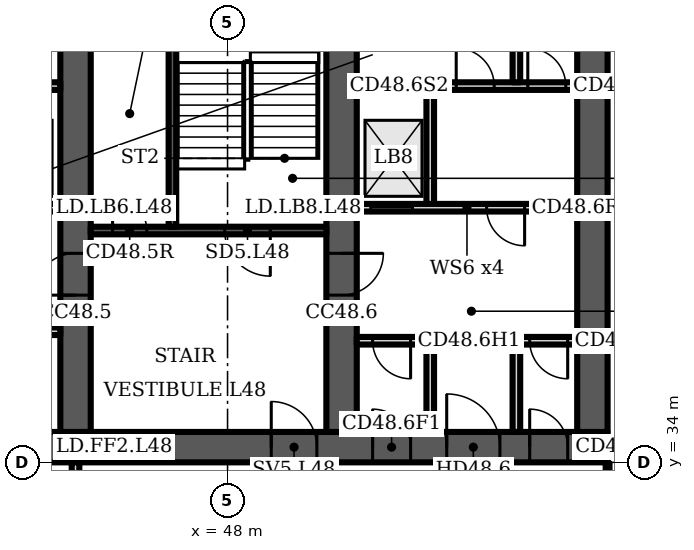
"""IFC4 building model, lengths in metres.
Left out: names, types, materials, properties, quantities, classifications, styles, units other than length and angle.
Written with IfcOpenShell. Run it as: python <this file> out.ifc"""

import sys

from ifc_helpers import new_model, si_unit, direction, frame, frame_2d, origin, place, context, subcontext, project, spatial, polyline, rectangle, outline, extrude, element, fill, save


model = new_model("IFC4")
c1 = context("Model", 3, precision=1e-05, world=origin(), true_north=direction((0.0, 1.0)))
c2 = subcontext(c1, "Body", "Model", "MODEL_VIEW")
j1 = project(units=[si_unit("LENGTHUNIT", "METRE"), si_unit("PLANEANGLEUNIT", "RADIAN")], contexts=[c1])
p1 = place(None, origin())
s1 = spatial("IfcSite", under=j1, at=p1, CompositionType="ELEMENT")
p2 = place(p1, origin())
s2 = spatial("IfcBuilding", under=s1, at=p2, CompositionType="ELEMENT")
p3 = place(p2, frame((0.0, 0.0, 195.1)))
s3 = spatial("IfcBuildingStorey", under=s2, at=p3, CompositionType="ELEMENT", Elevation=195.1)
p4 = place(p3, frame((16.0, 34.4, 0.0), z_axis=(0.0, 0.0, 1.0), x_axis=(1.0, 0.0, 0.0)))
e1 = element("IfcWall", 1, at=p4, inside=s3, PredefinedType="SHEAR", context=c2, shape_type="SweptSolid", body=[
    extrude(rectangle(XDim=42.0, YDim=0.8, at=frame_2d((21.0, 0.0))), origin(), (0.0, 0.0, 1.0), 3.6),
])
p5 = place(p4, frame((3.2, 0.0, 0.0)))
e2 = element("IfcOpeningElement", 2, at=p5, cuts=e1, PredefinedType="OPENING", context=c2, shape_type="SweptSolid", body=[
    extrude(rectangle(XDim=1.0, YDim=2.1, at=frame_2d((0.5, 1.05))), frame((0.0, 0.41, 0.0), z_axis=(0.0, -1.0, 0.0), x_axis=(1.0, 0.0, 0.0)), (0.0, 0.0, 1.0), 0.82),
])
p6 = place(p4, frame((7.65, 0.0, 0.0)))
e3 = element("IfcOpeningElement", 3, at=p6, cuts=e1, PredefinedType="OPENING", context=c2, shape_type="SweptSolid", body=[
    extrude(rectangle(XDim=1.2, YDim=2.1, at=frame_2d((0.6, 1.05))), frame((0.0, 0.41, 0.0), z_axis=(0.0, -1.0, 0.0), x_axis=(1.0, 0.0, 0.0)), (0.0, 0.0, 1.0), 0.82),
])
p7 = place(p4, frame((14.767, 0.0, 0.0)))
e4 = element("IfcOpeningElement", 4, at=p7, cuts=e1, PredefinedType="OPENING", context=c2, shape_type="SweptSolid", body=[
    extrude(rectangle(XDim=1.1, YDim=2.1, at=frame_2d((0.55, 1.05))), frame((0.0, 0.41, 0.0), z_axis=(0.0, -1.0, 0.0), x_axis=(1.0, 0.0, 0.0)), (0.0, 0.0, 1.0), 0.82),
])
p8 = place(p4, frame((19.133, 0.0, 0.0)))
e5 = element("IfcOpeningElement", 5, at=p8, cuts=e1, PredefinedType="OPENING", context=c2, shape_type="SweptSolid", body=[
    extrude(rectangle(XDim=1.1, YDim=2.1, at=frame_2d((0.55, 1.05))), frame((0.0, 0.41, 0.0), z_axis=(0.0, -1.0, 0.0), x_axis=(1.0, 0.0, 0.0)), (0.0, 0.0, 1.0), 0.82),
])
p9 = place(p4, frame((16.8, 0.0, 0.0)))
e6 = element("IfcOpeningElement", 6, at=p9, cuts=e1, PredefinedType="OPENING", context=c2, shape_type="SweptSolid", body=[
    extrude(rectangle(XDim=1.4, YDim=2.1, at=frame_2d((0.7, 1.05))), frame((0.0, 0.41, 0.0), z_axis=(0.0, -1.0, 0.0), x_axis=(1.0, 0.0, 0.0)), (0.0, 0.0, 1.0), 0.82),
])
p10 = place(p4, frame((21.767, 0.0, 0.0)))
e7 = element("IfcOpeningElement", 7, at=p10, cuts=e1, PredefinedType="OPENING", context=c2, shape_type="SweptSolid", body=[
    extrude(rectangle(XDim=1.1, YDim=2.1, at=frame_2d((0.55, 1.05))), frame((0.0, 0.41, 0.0), z_axis=(0.0, -1.0, 0.0), x_axis=(1.0, 0.0, 0.0)), (0.0, 0.0, 1.0), 0.82),
])
p11 = place(p4, frame((23.95, 0.0, 0.0)))
e8 = element("IfcOpeningElement", 8, at=p11, cuts=e1, PredefinedType="OPENING", context=c2, shape_type="SweptSolid", body=[
    extrude(rectangle(XDim=1.1, YDim=2.1, at=frame_2d((0.55, 1.05))), frame((0.0, 0.41, 0.0), z_axis=(0.0, -1.0, 0.0), x_axis=(1.0, 0.0, 0.0)), (0.0, 0.0, 1.0), 0.82),
])
p12 = place(p4, frame((26.133, 0.0, 0.0)))
e9 = element("IfcOpeningElement", 9, at=p12, cuts=e1, PredefinedType="OPENING", context=c2, shape_type="SweptSolid", body=[
    extrude(rectangle(XDim=1.1, YDim=2.1, at=frame_2d((0.55, 1.05))), frame((0.0, 0.41, 0.0), z_axis=(0.0, -1.0, 0.0), x_axis=(1.0, 0.0, 0.0)), (0.0, 0.0, 1.0), 0.82),
])
p13 = place(p4, frame((33.15, 0.0, 0.0)))
e10 = element("IfcOpeningElement", 10, at=p13, cuts=e1, PredefinedType="OPENING", context=c2, shape_type="SweptSolid", body=[
    extrude(rectangle(XDim=1.2, YDim=2.1, at=frame_2d((0.6, 1.05))), frame((0.0, 0.41, 0.0), z_axis=(0.0, -1.0, 0.0), x_axis=(1.0, 0.0, 0.0)), (0.0, 0.0, 1.0), 0.82),
])
p14 = place(p4, frame((35.817, 0.0, 0.0)))
e11 = element("IfcOpeningElement", 11, at=p14, cuts=e1, PredefinedType="OPENING", context=c2, shape_type="SweptSolid", body=[
    extrude(rectangle(XDim=1.0, YDim=2.1, at=frame_2d((0.5, 1.05))), frame((0.0, 0.41, 0.0), z_axis=(0.0, -1.0, 0.0), x_axis=(1.0, 0.0, 0.0)), (0.0, 0.0, 1.0), 0.82),
])
p15 = place(p4, frame((39.95, 0.0, 0.0)))
e12 = element("IfcOpeningElement", 12, at=p15, cuts=e1, PredefinedType="OPENING", context=c2, shape_type="SweptSolid", body=[
    extrude(rectangle(XDim=1.0, YDim=2.1, at=frame_2d((0.5, 1.05))), frame((0.0, 0.41, 0.0), z_axis=(0.0, -1.0, 0.0), x_axis=(1.0, 0.0, 0.0)), (0.0, 0.0, 1.0), 0.82),
])
p16 = place(p4, frame((37.767, 0.0, 0.0)))
e13 = element("IfcOpeningElement", 13, at=p16, cuts=e1, PredefinedType="OPENING", context=c2, shape_type="SweptSolid", body=[
    extrude(rectangle(XDim=1.4, YDim=2.1, at=frame_2d((0.7, 1.05))), frame((0.0, 0.41, 0.0), z_axis=(0.0, -1.0, 0.0), x_axis=(1.0, 0.0, 0.0)), (0.0, 0.0, 1.0), 0.82),
])
p17 = place(p3, frame((44.0, 34.8, 0.0), z_axis=(0.0, 0.0, 1.0), x_axis=(0.0, 1.0, 0.0)))
e14 = element("IfcWall", 14, at=p17, inside=s3, PredefinedType="SHEAR", context=c2, shape_type="SweptSolid", body=[
    extrude(rectangle(XDim=14.374, YDim=0.8, at=frame_2d((7.187, 0.0))), origin(), (0.0, 0.0, 1.0), 3.6),
])
p18 = place(p17, frame((11.312, 0.0, 0.0)))
e15 = element("IfcOpeningElement", 15, at=p18, cuts=e14, PredefinedType="OPENING", context=c2, shape_type="SweptSolid", body=[
    extrude(rectangle(XDim=1.0, YDim=2.1, at=frame_2d((0.5, 1.05))), frame((0.0, 0.41, 0.0), z_axis=(0.0, -1.0, 0.0), x_axis=(1.0, 0.0, 0.0)), (0.0, 0.0, 1.0), 0.82),
])
p19 = place(p17, frame((3.6, 0.0, 0.0)))
e16 = element("IfcOpeningElement", 16, at=p19, cuts=e14, PredefinedType="OPENING", context=c2, shape_type="SweptSolid", body=[
    extrude(rectangle(XDim=1.1, YDim=2.1, at=frame_2d((0.55, 1.05))), frame((0.0, 0.41, 0.0), z_axis=(0.0, -1.0, 0.0), x_axis=(1.0, 0.0, 0.0)), (0.0, 0.0, 1.0), 0.82),
])
p20 = place(p3, frame((51.0, 34.8, 0.0), z_axis=(0.0, 0.0, 1.0), x_axis=(0.0, 1.0, 0.0)))
e17 = element("IfcWall", 17, at=p20, inside=s3, PredefinedType="SHEAR", context=c2, shape_type="SweptSolid", body=[
    extrude(rectangle(XDim=13.762, YDim=0.8, at=frame_2d((6.881, 0.0))), origin(), (0.0, 0.0, 1.0), 3.6),
])
p21 = place(p20, frame((3.6, 0.0, 0.0)))
e18 = element("IfcOpeningElement", 18, at=p21, cuts=e17, PredefinedType="OPENING", context=c2, shape_type="SweptSolid", body=[
    extrude(rectangle(XDim=1.1, YDim=2.1, at=frame_2d((0.55, 1.05))), frame((0.0, 0.41, 0.0), z_axis=(0.0, -1.0, 0.0), x_axis=(1.0, 0.0, 0.0)), (0.0, 0.0, 1.0), 0.82),
])
p22 = place(p3, frame((57.6, 34.8, 0.0), z_axis=(0.0, 0.0, 1.0), x_axis=(0.0, 1.0, 0.0)))
e19 = element("IfcWall", 19, at=p22, inside=s3, PredefinedType="SHEAR", context=c2, shape_type="SweptSolid", body=[
    extrude(rectangle(XDim=13.184, YDim=0.8, at=frame_2d((6.592, 0.0))), origin(), (0.0, 0.0, 1.0), 3.6),
])
p23 = place(p3, frame((37.4, 40.7, 0.0), z_axis=(0.0, 0.0, 1.0), x_axis=(1.0, 0.0, 0.0)))
e20 = element("IfcWall", 20, at=p23, inside=s3, PredefinedType="PARTITIONING", context=c2, shape_type="SweptSolid", body=[
    extrude(rectangle(XDim=6.2, YDim=0.2, at=frame_2d((3.1, 0.0))), origin(), (0.0, 0.0, 1.0), 3.2),
])
p24 = place(p23, frame((0.367, 0.0, 0.0)))
e21 = element("IfcOpeningElement", 21, at=p24, cuts=e20, PredefinedType="OPENING", context=c2, shape_type="SweptSolid", body=[
    extrude(rectangle(XDim=1.1, YDim=2.1, at=frame_2d((0.55, 1.05))), frame((0.0, 0.11, 0.0), z_axis=(0.0, -1.0, 0.0), x_axis=(1.0, 0.0, 0.0)), (0.0, 0.0, 1.0), 0.22),
])
p25 = place(p23, frame((2.55, 0.0, 0.0)))
e22 = element("IfcOpeningElement", 22, at=p25, cuts=e20, PredefinedType="OPENING", context=c2, shape_type="SweptSolid", body=[
    extrude(rectangle(XDim=1.1, YDim=2.1, at=frame_2d((0.55, 1.05))), frame((0.0, 0.11, 0.0), z_axis=(0.0, -1.0, 0.0), x_axis=(1.0, 0.0, 0.0)), (0.0, 0.0, 1.0), 0.22),
])
p26 = place(p23, frame((4.733, 0.0, 0.0)))
e23 = element("IfcOpeningElement", 23, at=p26, cuts=e20, PredefinedType="OPENING", context=c2, shape_type="SweptSolid", body=[
    extrude(rectangle(XDim=1.1, YDim=2.1, at=frame_2d((0.55, 1.05))), frame((0.0, 0.11, 0.0), z_axis=(0.0, -1.0, 0.0), x_axis=(1.0, 0.0, 0.0)), (0.0, 0.0, 1.0), 0.22),
])
p27 = place(p3, frame((0.0, 0.0, -0.0)))
e24 = element("IfcWall", 24, at=p27, inside=s3, PredefinedType="PARTITIONING", context=c2, shape_type="SweptSolid", body=[
    extrude(outline(polyline([(41.567, 37.1), (39.433, 37.1), (39.433, 34.8), (39.233, 34.8), (39.233, 37.65), (37.4, 37.65), (37.4, 37.85), (39.233, 37.85), (39.433, 37.85), (39.433, 37.3), (41.567, 37.3), (41.567, 37.55), (41.767, 37.55), (43.6, 37.55), (43.6, 37.35), (41.767, 37.35), (41.767, 34.8), (41.567, 34.8), (41.567, 37.1)])), origin(), (0.0, 0.0, 1.0), 3.2),
])
p28 = place(p3, frame((0.0, 0.0, -0.0)))
e25 = element("IfcWall", 25, at=p28, inside=s3, PredefinedType="PARTITIONING", context=c2, shape_type="SweptSolid", body=[
    extrude(outline(polyline([(39.433, 40.8), (39.233, 40.8), (39.233, 43.8), (37.4, 43.8), (37.4, 44.0), (43.6, 44.0), (43.6, 43.8), (41.767, 43.8), (41.767, 40.8), (41.567, 40.8), (41.567, 43.8), (39.433, 43.8), (39.433, 40.8)])), origin(), (0.0, 0.0, 1.0), 3.2),
])
p29 = place(p3, frame((44.4, 40.1, 0.0), z_axis=(0.0, 0.0, 1.0), x_axis=(1.0, 0.0, 0.0)))
e26 = element("IfcWall", 26, at=p29, inside=s3, PredefinedType="SHEAR", context=c2, shape_type="SweptSolid", body=[
    extrude(rectangle(XDim=6.2, YDim=0.2, at=frame_2d((3.1, 0.0))), origin(), (0.0, 0.0, 1.0), 3.2),
])
p30 = place(p29, frame((3.525, 0.0, 0.0)))
e27 = element("IfcOpeningElement", 27, at=p30, cuts=e26, PredefinedType="OPENING", context=c2, shape_type="SweptSolid", body=[
    extrude(rectangle(XDim=1.2, YDim=2.1, at=frame_2d((0.6, 1.05))), frame((0.0, 0.11, 0.0), z_axis=(0.0, -1.0, 0.0), x_axis=(1.0, 0.0, 0.0)), (0.0, 0.0, 1.0), 0.22),
])
p31 = place(p29, frame((0.575, 0.0, 0.0)))
e28 = element("IfcOpeningElement", 28, at=p31, cuts=e26, PredefinedType="OPENING", context=c2, shape_type="SweptSolid", body=[
    extrude(rectangle(XDim=0.9, YDim=2.1, at=frame_2d((0.45, 1.05))), frame((0.0, 0.11, 0.0), z_axis=(0.0, -1.0, 0.0), x_axis=(1.0, 0.0, 0.0)), (0.0, 0.0, 1.0), 0.22),
])
p32 = place(p3, frame((46.55, 40.2, 0.0), z_axis=(0.0, 0.0, 1.0), x_axis=(0.0, 1.0, 0.0)))
e29 = element("IfcWall", 29, at=p32, inside=s3, PredefinedType="SHEAR", context=c2, shape_type="SweptSolid", body=[
    extrude(rectangle(XDim=7.2, YDim=0.2, at=frame_2d((3.6, 0.0))), origin(), (0.0, 0.0, 1.0), 3.2),
])
p33 = place(p3, frame((51.4, 37.2, 0.0), z_axis=(0.0, 0.0, 1.0), x_axis=(1.0, 0.0, 0.0)))
e30 = element("IfcWall", 30, at=p33, inside=s3, PredefinedType="PARTITIONING", context=c2, shape_type="SweptSolid", body=[
    extrude(rectangle(XDim=1.833, YDim=0.2, at=frame_2d((0.917, 0.0))), origin(), (0.0, 0.0, 1.0), 3.2),
])
p34 = place(p33, frame((0.417, 0.0, 0.0)))
e31 = element("IfcOpeningElement", 31, at=p34, cuts=e30, PredefinedType="OPENING", context=c2, shape_type="SweptSolid", body=[
    extrude(rectangle(XDim=1.0, YDim=2.1, at=frame_2d((0.5, 1.05))), frame((0.0, 0.11, 0.0), z_axis=(0.0, -1.0, 0.0), x_axis=(1.0, 0.0, 0.0)), (0.0, 0.0, 1.0), 0.22),
])
p35 = place(p3, frame((55.7, 37.2, 0.0), z_axis=(0.0, 0.0, 1.0), x_axis=(1.0, 0.0, 0.0)))
e32 = element("IfcWall", 32, at=p35, inside=s3, PredefinedType="PARTITIONING", context=c2, shape_type="SweptSolid", body=[
    extrude(rectangle(XDim=1.5, YDim=0.2, at=frame_2d((0.75, 0.0))), origin(), (0.0, 0.0, 1.0), 3.2),
])
p36 = place(p35, frame((0.25, 0.0, 0.0)))
e33 = element("IfcOpeningElement", 33, at=p36, cuts=e32, PredefinedType="OPENING", context=c2, shape_type="SweptSolid", body=[
    extrude(rectangle(XDim=1.0, YDim=2.1, at=frame_2d((0.5, 1.05))), frame((0.0, 0.11, 0.0), z_axis=(0.0, -1.0, 0.0), x_axis=(1.0, 0.0, 0.0)), (0.0, 0.0, 1.0), 0.22),
])
p37 = place(p3, frame((51.4, 40.7, 0.0), z_axis=(0.0, 0.0, 1.0), x_axis=(1.0, 0.0, 0.0)))
e34 = element("IfcWall", 34, at=p37, inside=s3, PredefinedType="PARTITIONING", context=c2, shape_type="SweptSolid", body=[
    extrude(rectangle(XDim=5.8, YDim=0.2, at=frame_2d((2.9, 0.0))), origin(), (0.0, 0.0, 1.0), 3.2),
])
p38 = place(p37, frame((0.367, 0.0, 0.0)))
e35 = element("IfcOpeningElement", 35, at=p38, cuts=e34, PredefinedType="OPENING", context=c2, shape_type="SweptSolid", body=[
    extrude(rectangle(XDim=1.1, YDim=2.1, at=frame_2d((0.55, 1.05))), frame((0.0, 0.11, 0.0), z_axis=(0.0, -1.0, 0.0), x_axis=(1.0, 0.0, 0.0)), (0.0, 0.0, 1.0), 0.22),
])
p39 = place(p37, frame((3.417, 0.0, 0.0)))
e36 = element("IfcOpeningElement", 36, at=p39, cuts=e34, PredefinedType="OPENING", context=c2, shape_type="SweptSolid", body=[
    extrude(rectangle(XDim=1.0, YDim=2.1, at=frame_2d((0.5, 1.05))), frame((0.0, 0.11, 0.0), z_axis=(0.0, -1.0, 0.0), x_axis=(1.0, 0.0, 0.0)), (0.0, 0.0, 1.0), 0.22),
])
p40 = place(p3, frame((51.4, 43.9, 0.0), z_axis=(0.0, 0.0, 1.0), x_axis=(1.0, 0.0, 0.0)))
e37 = element("IfcWall", 37, at=p40, inside=s3, PredefinedType="PARTITIONING", context=c2, shape_type="SweptSolid", body=[
    extrude(rectangle(XDim=5.8, YDim=0.2, at=frame_2d((2.9, 0.0))), origin(), (0.0, 0.0, 1.0), 3.2),
])
p41 = place(p40, frame((2.617, 0.0, 0.0)))
e38 = element("IfcOpeningElement", 38, at=p41, cuts=e37, PredefinedType="OPENING", context=c2, shape_type="SweptSolid", body=[
    extrude(rectangle(XDim=1.0, YDim=2.1, at=frame_2d((0.5, 1.05))), frame((0.0, 0.11, 0.0), z_axis=(0.0, -1.0, 0.0), x_axis=(1.0, 0.0, 0.0)), (0.0, 0.0, 1.0), 0.22),
])
p42 = place(p40, frame((4.5, 0.0, 0.0)))
e39 = element("IfcOpeningElement", 39, at=p42, cuts=e37, PredefinedType="OPENING", context=c2, shape_type="SweptSolid", body=[
    extrude(rectangle(XDim=1.0, YDim=2.1, at=frame_2d((0.5, 1.05))), frame((0.0, 0.11, 0.0), z_axis=(0.0, -1.0, 0.0), x_axis=(1.0, 0.0, 0.0)), (0.0, 0.0, 1.0), 0.22),
])
p43 = place(p3, frame((0.0, 0.0, -0.0)))
e40 = element("IfcWall", 40, at=p43, inside=s3, PredefinedType="PARTITIONING", context=c2, shape_type="SweptSolid", body=[
    extrude(outline(polyline([(53.233, 34.8), (53.233, 37.3), (53.433, 37.3), (53.433, 34.8), (53.233, 34.8)])), origin(), (0.0, 0.0, 1.0), 3.2),
])
p44 = place(p3, frame((0.0, 0.0, -0.0)))
e41 = element("IfcWall", 41, at=p44, inside=s3, PredefinedType="PARTITIONING", context=c2, shape_type="SweptSolid", body=[
    extrude(outline(polyline([(55.5, 34.8), (55.5, 37.3), (55.7, 37.3), (55.7, 34.8), (55.5, 34.8)])), origin(), (0.0, 0.0, 1.0), 3.2),
])
p45 = place(p3, frame((0.0, 0.0, -0.0)))
e42 = element("IfcWall", 42, at=p45, inside=s3, PredefinedType="PARTITIONING", context=c2, shape_type="SweptSolid", body=[
    extrude(outline(polyline([(53.433, 40.8), (53.433, 43.8), (53.233, 43.8), (53.233, 40.8), (53.433, 40.8)])), origin(), (0.0, 0.0, 1.0), 3.2),
])
p46 = place(p3, frame((55.6, 44.0, 0.0), z_axis=(0.0, 0.0, 1.0), x_axis=(0.0, 1.0, 0.0)))
e43 = element("IfcWall", 43, at=p46, inside=s3, PredefinedType="PARTITIONING", context=c2, shape_type="SweptSolid", body=[
    extrude(rectangle(XDim=4.034, YDim=0.2, at=frame_2d((2.017, 0.0))), origin(), (0.0, 0.0, 1.0), 3.2),
])
p47 = place(p3, frame((44.0, 30.5, 0.0), z_axis=(0.0, 0.0, 1.0), x_axis=(0.0, 1.0, 0.0)))
e44 = element("IfcWall", 44, at=p47, inside=s3, PredefinedType="PARTITIONING", context=c2, shape_type="SweptSolid", body=[
    extrude(rectangle(XDim=3.5, YDim=0.2, at=frame_2d((1.75, 0.0))), origin(), (0.0, 0.0, 1.0), 3.2),
])
p48 = place(p47, frame((1.2, 0.0, 0.0)))
e45 = element("IfcOpeningElement", 45, at=p48, cuts=e44, PredefinedType="OPENING", context=c2, shape_type="SweptSolid", body=[
    extrude(rectangle(XDim=1.1, YDim=2.1, at=frame_2d((0.55, 1.05))), frame((0.0, 0.11, 0.0), z_axis=(0.0, -1.0, 0.0), x_axis=(1.0, 0.0, 0.0)), (0.0, 0.0, 1.0), 0.22),
])
p49 = place(p3, frame((58.0, 30.5, 0.0), z_axis=(0.0, 0.0, 1.0), x_axis=(0.0, 1.0, 0.0)))
e46 = element("IfcWall", 46, at=p49, inside=s3, PredefinedType="PARTITIONING", context=c2, shape_type="SweptSolid", body=[
    extrude(rectangle(XDim=3.48, YDim=0.1, at=frame_2d((1.74, 0.0))), origin(), (0.0, 0.0, 1.0), 3.2),
])
p50 = place(p30, origin())
e47 = element("IfcDoor", 47, at=p50, inside=s3, OperationType="SINGLE_SWING_RIGHT", PredefinedType="DOOR", context=c2, shape_type="SweptSolid", body=[
    extrude(rectangle(XDim=1.2, YDim=2.1, at=frame_2d((0.6, 1.05))), frame((0.0, 0.025, 0.0), z_axis=(0.0, -1.0, 0.0), x_axis=(1.0, 0.0, 0.0)), (0.0, 0.0, 1.0), 0.05),
])
fill(e27, e47)
p51 = place(p31, origin())
e48 = element("IfcDoor", 48, at=p51, inside=s3, OperationType="SINGLE_SWING_LEFT", PredefinedType="DOOR", context=c2, shape_type="SweptSolid", body=[
    extrude(rectangle(XDim=0.9, YDim=2.1, at=frame_2d((0.45, 1.05))), frame((0.0, 0.025, 0.0), z_axis=(0.0, -1.0, 0.0), x_axis=(1.0, 0.0, 0.0)), (0.0, 0.0, 1.0), 0.05),
])
fill(e28, e48)
p52 = place(p13, origin())
e49 = element("IfcDoor", 49, at=p52, inside=s3, OperationType="SINGLE_SWING_LEFT", PredefinedType="DOOR", context=c2, shape_type="SweptSolid", body=[
    extrude(rectangle(XDim=1.2, YDim=2.1, at=frame_2d((0.6, 1.05))), frame((0.0, 0.025, 0.0), z_axis=(0.0, -1.0, 0.0), x_axis=(1.0, 0.0, 0.0)), (0.0, 0.0, 1.0), 0.05),
])
fill(e10, e49)
p53 = place(p14, origin())
e50 = element("IfcDoor", 50, at=p53, inside=s3, OperationType="SINGLE_SWING_LEFT", PredefinedType="DOOR", context=c2, shape_type="SweptSolid", body=[
    extrude(rectangle(XDim=1.0, YDim=2.1, at=frame_2d((0.5, 1.05))), frame((0.0, 0.4, 0.0), z_axis=(0.0, -1.0, 0.0), x_axis=(1.0, 0.0, 0.0)), (0.0, 0.0, 1.0), 0.8),
])
fill(e11, e50)
p54 = place(p34, origin())
e51 = element("IfcDoor", 51, at=p54, inside=s3, OperationType="SINGLE_SWING_RIGHT", PredefinedType="DOOR", context=c2, shape_type="SweptSolid", body=[
    extrude(rectangle(XDim=1.0, YDim=2.1, at=frame_2d((0.5, 1.05))), frame((0.0, 0.025, 0.0), z_axis=(0.0, -1.0, 0.0), x_axis=(1.0, 0.0, 0.0)), (0.0, 0.0, 1.0), 0.05),
])
fill(e31, e51)
p55 = place(p15, origin())
e52 = element("IfcDoor", 52, at=p55, inside=s3, OperationType="SINGLE_SWING_LEFT", PredefinedType="DOOR", context=c2, shape_type="SweptSolid", body=[
    extrude(rectangle(XDim=1.0, YDim=2.1, at=frame_2d((0.5, 1.05))), frame((0.0, 0.4, 0.0), z_axis=(0.0, -1.0, 0.0), x_axis=(1.0, 0.0, 0.0)), (0.0, 0.0, 1.0), 0.8),
])
fill(e12, e52)
p56 = place(p36, origin())
e53 = element("IfcDoor", 53, at=p56, inside=s3, OperationType="SINGLE_SWING_RIGHT", PredefinedType="DOOR", context=c2, shape_type="SweptSolid", body=[
    extrude(rectangle(XDim=1.0, YDim=2.1, at=frame_2d((0.5, 1.05))), frame((0.0, 0.025, 0.0), z_axis=(0.0, -1.0, 0.0), x_axis=(1.0, 0.0, 0.0)), (0.0, 0.0, 1.0), 0.05),
])
fill(e33, e53)
p57 = place(p16, origin())
e54 = element("IfcDoor", 54, at=p57, inside=s3, OperationType="DOUBLE_DOOR_SINGLE_SWING", PredefinedType="DOOR", context=c2, shape_type="SweptSolid", body=[
    extrude(rectangle(XDim=1.4, YDim=2.1, at=frame_2d((0.7, 1.05))), frame((0.0, 0.025, 0.0), z_axis=(0.0, -1.0, 0.0), x_axis=(1.0, 0.0, 0.0)), (0.0, 0.0, 1.0), 0.05),
])
fill(e13, e54)
p58 = place(p38, origin())
e55 = element("IfcDoor", 55, at=p58, inside=s3, OperationType="DOUBLE_DOOR_SLIDING", PredefinedType="DOOR", context=c2, shape_type="SweptSolid", body=[
    extrude(rectangle(XDim=1.1, YDim=2.1, at=frame_2d((0.55, 1.05))), frame((0.0, 0.025, 0.0), z_axis=(0.0, -1.0, 0.0), x_axis=(1.0, 0.0, 0.0)), (0.0, 0.0, 1.0), 0.05),
])
fill(e35, e55)
p59 = place(p39, origin())
e56 = element("IfcDoor", 56, at=p59, inside=s3, OperationType="SINGLE_SWING_RIGHT", PredefinedType="DOOR", context=c2, shape_type="SweptSolid", body=[
    extrude(rectangle(XDim=1.0, YDim=2.1, at=frame_2d((0.5, 1.05))), frame((0.0, 0.025, 0.0), z_axis=(0.0, -1.0, 0.0), x_axis=(1.0, 0.0, 0.0)), (0.0, 0.0, 1.0), 0.05),
])
fill(e36, e56)
p60 = place(p41, origin())
e57 = element("IfcDoor", 57, at=p60, inside=s3, OperationType="SINGLE_SWING_LEFT", PredefinedType="DOOR", context=c2, shape_type="SweptSolid", body=[
    extrude(rectangle(XDim=1.0, YDim=2.1, at=frame_2d((0.5, 1.05))), frame((0.0, 0.025, 0.0), z_axis=(0.0, -1.0, 0.0), x_axis=(1.0, 0.0, 0.0)), (0.0, 0.0, 1.0), 0.05),
])
fill(e38, e57)
p61 = place(p42, origin())
e58 = element("IfcDoor", 58, at=p61, inside=s3, OperationType="SINGLE_SWING_LEFT", PredefinedType="DOOR", context=c2, shape_type="SweptSolid", body=[
    extrude(rectangle(XDim=1.0, YDim=2.1, at=frame_2d((0.5, 1.05))), frame((0.0, 0.025, 0.0), z_axis=(0.0, -1.0, 0.0), x_axis=(1.0, 0.0, 0.0)), (0.0, 0.0, 1.0), 0.05),
])
fill(e39, e58)
p62 = place(p19, origin())
e59 = element("IfcDoor", 59, at=p62, inside=s3, OperationType="SINGLE_SWING_LEFT", PredefinedType="DOOR", context=c2, shape_type="SweptSolid", body=[
    extrude(rectangle(XDim=1.1, YDim=2.1, at=frame_2d((0.55, 1.05))), frame((0.0, 0.025, 0.0), z_axis=(0.0, -1.0, 0.0), x_axis=(1.0, 0.0, 0.0)), (0.0, 0.0, 1.0), 0.05),
])
fill(e16, e59)
p63 = place(p21, origin())
e60 = element("IfcDoor", 60, at=p63, inside=s3, OperationType="SINGLE_SWING_RIGHT", PredefinedType="DOOR", context=c2, shape_type="SweptSolid", body=[
    extrude(rectangle(XDim=1.1, YDim=2.1, at=frame_2d((0.55, 1.05))), frame((0.0, 0.025, 0.0), z_axis=(0.0, -1.0, 0.0), x_axis=(1.0, 0.0, 0.0)), (0.0, 0.0, 1.0), 0.05),
])
fill(e18, e60)
save(model, sys.argv[1])
